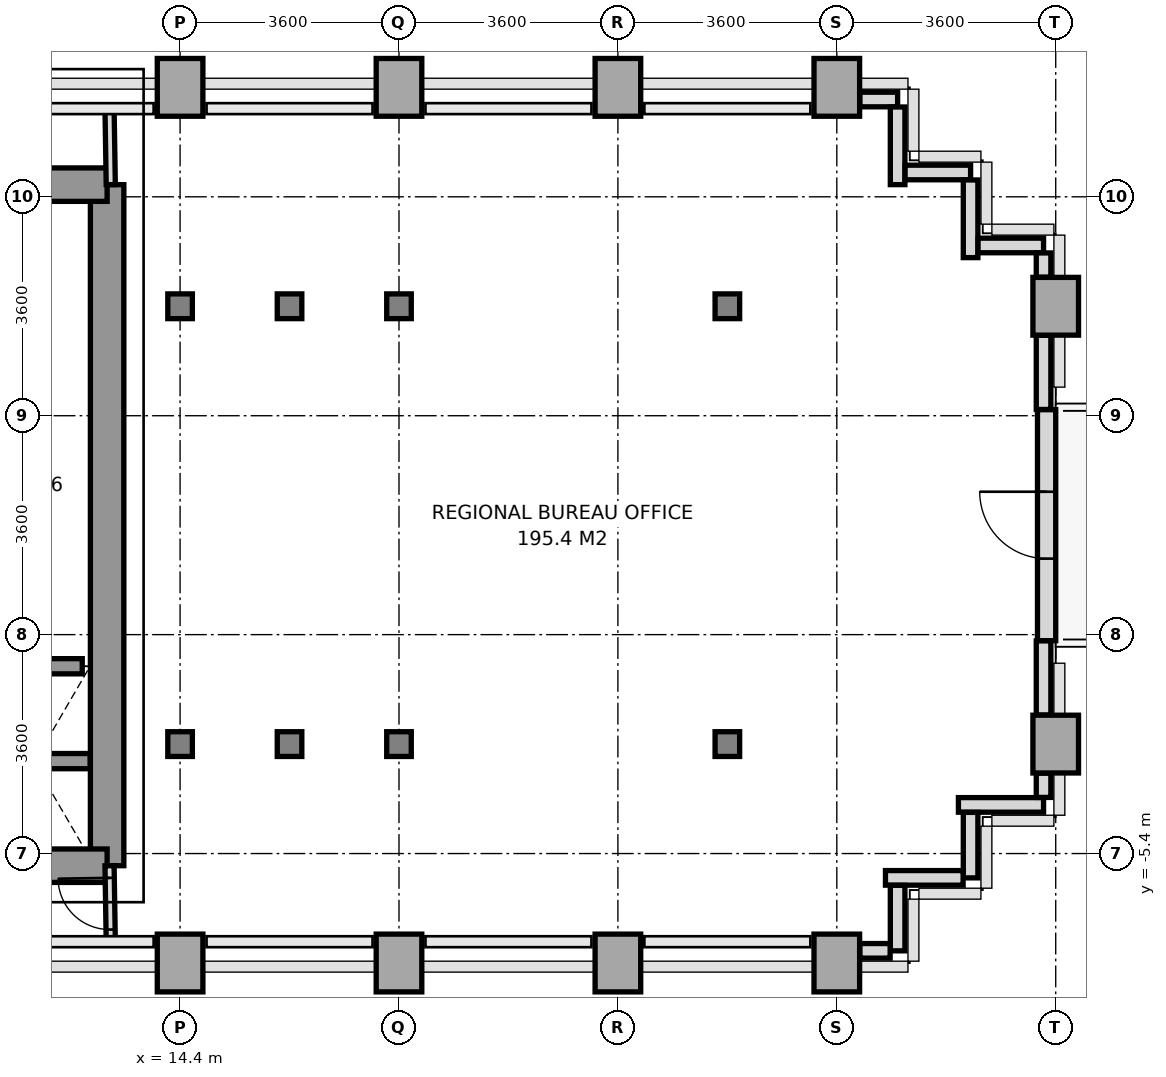
"""IFC4 building model, lengths in metres.
Left out: names, types, materials, properties, quantities, classifications, styles, units other than length and angle.
Written with IfcOpenShell. Run it as: python <this file> out.ifc"""

import sys

from ifc_helpers import new_model, si_unit, direction, frame, frame_2d, origin, origin_2d, place, context, subcontext, project, spatial, rectangle, i_section, extrude, source, transform, mapped, element, fill, save


model = new_model("IFC4")
c1 = context("Model", 3, precision=1e-05, world=origin(), true_north=direction((0.0, 1.0)))
c2 = subcontext(c1, "Body", "Model", "MODEL_VIEW")
j1 = project(units=[si_unit("LENGTHUNIT", "METRE"), si_unit("PLANEANGLEUNIT", "RADIAN")], contexts=[c1])
p1 = place(None, origin())
s1 = spatial("IfcSite", under=j1, at=p1, CompositionType="ELEMENT")
p2 = place(p1, origin())
s2 = spatial("IfcBuilding", under=s1, at=p2, CompositionType="ELEMENT")
p3 = place(p2, frame((0.0, 0.0, 40.8)))
s3 = spatial("IfcBuildingStorey", under=s2, at=p3, CompositionType="ELEMENT", Elevation=40.8)
m1 = source(origin(), c2, "Body", "SweptSolid", [
    extrude(rectangle(XDim=0.75, YDim=0.95, at=origin_2d()), origin(), (0.0, 0.0, 1.0), 3.2),
])
p4 = place(p3, frame((14.4, -7.2, 0.0), z_axis=(0.0, 0.0, 1.0), x_axis=(1.0, 0.0, 0.0)))
e1 = element("IfcColumn", 1, at=p4, inside=s3, PredefinedType="COLUMN", context=c2, shape_type="MappedRepresentation", body=[
    mapped(m1, transform((0.0, 0.0, 0.0), x_axis=(1.0, 0.0, 0.0), y_axis=(0.0, 1.0, 0.0), z_axis=(0.0, 0.0, 1.0), scale=1.0)),
])
m2 = source(origin(), c2, "Body", "SweptSolid", [
    extrude(i_section(OverallWidth=0.404, OverallDepth=0.407, WebThickness=0.022, FlangeThickness=0.035, at=origin_2d()), origin(), (0.0, 0.0, 1.0), 3.2),
])
for number, where, z_axis, x_axis in (
    (2, (14.4, -3.6, 0.0), (0.0, 0.0, 1.0), (1.0, 0.0, 0.0)),
    (3, (14.4, 3.6, 0.0), (0.0, 0.0, 1.0), (1.0, 0.0, 0.0)),
):
    element("IfcColumn", number, at=place(p3, frame(where, z_axis=z_axis, x_axis=x_axis)), inside=s3, PredefinedType="COLUMN", context=c2, shape_type="MappedRepresentation", body=[
        mapped(m2, transform((0.0, 0.0, 0.0), x_axis=(1.0, 0.0, 0.0), y_axis=(0.0, 1.0, 0.0), z_axis=(0.0, 0.0, 1.0), scale=1.0)),
    ])
p5 = place(p3, frame((14.4, 7.2, 0.0), z_axis=(0.0, 0.0, 1.0), x_axis=(1.0, 0.0, 0.0)))
e4 = element("IfcColumn", 4, at=p5, inside=s3, PredefinedType="COLUMN", context=c2, shape_type="MappedRepresentation", body=[
    mapped(m1, transform((0.0, 0.0, 0.0), x_axis=(1.0, 0.0, 0.0), y_axis=(0.0, 1.0, 0.0), z_axis=(0.0, 0.0, 1.0), scale=1.0)),
])
for number, where, z_axis, x_axis in (
    (5, (16.2, -3.6, 0.0), (0.0, 0.0, 1.0), (1.0, 0.0, 0.0)),
    (6, (16.2, 3.6, 0.0), (0.0, 0.0, 1.0), (1.0, 0.0, 0.0)),
):
    element("IfcColumn", number, at=place(p3, frame(where, z_axis=z_axis, x_axis=x_axis)), inside=s3, PredefinedType="COLUMN", context=c2, shape_type="MappedRepresentation", body=[
        mapped(m2, transform((0.0, 0.0, 0.0), x_axis=(1.0, 0.0, 0.0), y_axis=(0.0, 1.0, 0.0), z_axis=(0.0, 0.0, 1.0), scale=1.0)),
    ])
p6 = place(p3, frame((18.0, -7.2, 0.0), z_axis=(0.0, 0.0, 1.0), x_axis=(1.0, 0.0, 0.0)))
e7 = element("IfcColumn", 7, at=p6, inside=s3, PredefinedType="COLUMN", context=c2, shape_type="MappedRepresentation", body=[
    mapped(m1, transform((0.0, 0.0, 0.0), x_axis=(1.0, 0.0, 0.0), y_axis=(0.0, 1.0, 0.0), z_axis=(0.0, 0.0, 1.0), scale=1.0)),
])
for number, where, z_axis, x_axis in (
    (8, (18.0, -3.6, 0.0), (0.0, 0.0, 1.0), (1.0, 0.0, 0.0)),
    (9, (18.0, 3.6, 0.0), (0.0, 0.0, 1.0), (1.0, 0.0, 0.0)),
):
    element("IfcColumn", number, at=place(p3, frame(where, z_axis=z_axis, x_axis=x_axis)), inside=s3, PredefinedType="COLUMN", context=c2, shape_type="MappedRepresentation", body=[
        mapped(m2, transform((0.0, 0.0, 0.0), x_axis=(1.0, 0.0, 0.0), y_axis=(0.0, 1.0, 0.0), z_axis=(0.0, 0.0, 1.0), scale=1.0)),
    ])
for number, where, z_axis, x_axis in (
    (10, (18.0, 7.2, 0.0), (0.0, 0.0, 1.0), (1.0, 0.0, 0.0)),
    (11, (21.6, -7.2, 0.0), (0.0, 0.0, 1.0), (1.0, 0.0, 0.0)),
    (12, (21.6, 7.2, 0.0), (0.0, 0.0, 1.0), (1.0, 0.0, 0.0)),
):
    element("IfcColumn", number, at=place(p3, frame(where, z_axis=z_axis, x_axis=x_axis)), inside=s3, PredefinedType="COLUMN", context=c2, shape_type="MappedRepresentation", body=[
        mapped(m1, transform((0.0, 0.0, 0.0), x_axis=(1.0, 0.0, 0.0), y_axis=(0.0, 1.0, 0.0), z_axis=(0.0, 0.0, 1.0), scale=1.0)),
    ])
for number, where, z_axis, x_axis in (
    (13, (23.4, -3.6, 0.0), (0.0, 0.0, 1.0), (1.0, 0.0, 0.0)),
    (14, (23.4, 3.6, 0.0), (0.0, 0.0, 1.0), (1.0, 0.0, 0.0)),
):
    element("IfcColumn", number, at=place(p3, frame(where, z_axis=z_axis, x_axis=x_axis)), inside=s3, PredefinedType="COLUMN", context=c2, shape_type="MappedRepresentation", body=[
        mapped(m2, transform((0.0, 0.0, 0.0), x_axis=(1.0, 0.0, 0.0), y_axis=(0.0, 1.0, 0.0), z_axis=(0.0, 0.0, 1.0), scale=1.0)),
    ])
for number, where, z_axis, x_axis in (
    (15, (25.2, -7.2, 0.0), (0.0, 0.0, 1.0), (1.0, 0.0, 0.0)),
    (16, (25.2, 7.2, 0.0), (0.0, 0.0, 1.0), (1.0, 0.0, 0.0)),
    (17, (28.8, -3.6, 0.0), (0.0, 0.0, 1.0), (1.0, 0.0, 0.0)),
    (18, (28.8, 3.6, 0.0), (0.0, 0.0, 1.0), (1.0, 0.0, 0.0)),
):
    element("IfcColumn", number, at=place(p3, frame(where, z_axis=z_axis, x_axis=x_axis)), inside=s3, PredefinedType="COLUMN", context=c2, shape_type="MappedRepresentation", body=[
        mapped(m1, transform((0.0, 0.0, 0.0), x_axis=(1.0, 0.0, 0.0), y_axis=(0.0, 1.0, 0.0), z_axis=(0.0, 0.0, 1.0), scale=1.0)),
    ])
p7 = place(p3, frame((28.65, -1.9, 0.0), z_axis=(0.0, 0.0, 1.0), x_axis=(0.0, 1.0, 0.0)))
e19 = element("IfcWall", 19, at=p7, inside=s3, PredefinedType="SOLIDWALL", context=c2, shape_type="SweptSolid", body=[
    extrude(rectangle(XDim=3.8, YDim=0.3, at=frame_2d((1.9, 0.0))), origin(), (0.0, 0.0, 1.0), 2.45),
])
p8 = place(p7, frame((1.35, 0.0, 0.0)))
e20 = element("IfcOpeningElement", 20, at=p8, cuts=e19, PredefinedType="OPENING", context=c2, shape_type="SweptSolid", body=[
    extrude(rectangle(XDim=1.1, YDim=2.3, at=frame_2d((0.55, 1.15))), frame((0.0, 0.16, 0.0), z_axis=(0.0, -1.0, 0.0), x_axis=(1.0, 0.0, 0.0)), (0.0, 0.0, 1.0), 0.32),
])
p9 = place(p3, frame((28.6, -4.6, 0.0), z_axis=(0.0, 0.0, 1.0), x_axis=(-1.0, 0.0, 0.0)))
e21 = element("IfcWall", 21, at=p9, inside=s3, PredefinedType="PARAPET", context=c2, shape_type="SweptSolid", body=[
    extrude(rectangle(XDim=1.4, YDim=0.24, at=frame_2d((0.7, 0.0))), origin(), (0.0, 0.0, 1.0), 1.15),
])
p10 = place(p3, frame((27.4, -4.723, 0.0), z_axis=(0.0, 0.0, 1.0), x_axis=(0.0, -1.0, 0.0)))
e22 = element("IfcWall", 22, at=p10, inside=s3, PredefinedType="PARAPET", context=c2, shape_type="SweptSolid", body=[
    extrude(rectangle(XDim=1.077, YDim=0.24, at=frame_2d((0.539, 0.0))), origin(), (0.0, 0.0, 1.0), 1.15),
])
p11 = place(p3, frame((27.277, -5.8, 0.0), z_axis=(0.0, 0.0, 1.0), x_axis=(-1.0, 0.0, 0.0)))
e23 = element("IfcWall", 23, at=p11, inside=s3, PredefinedType="PARAPET", context=c2, shape_type="SweptSolid", body=[
    extrude(rectangle(XDim=1.277, YDim=0.24, at=frame_2d((0.639, 0.0))), origin(), (0.0, 0.0, 1.0), 1.15),
])
p12 = place(p3, frame((26.2, -5.923, 0.0), z_axis=(0.0, 0.0, 1.0), x_axis=(0.0, -1.0, 0.0)))
e24 = element("IfcWall", 24, at=p12, inside=s3, PredefinedType="PARAPET", context=c2, shape_type="SweptSolid", body=[
    extrude(rectangle(XDim=1.077, YDim=0.24, at=frame_2d((0.539, 0.0))), origin(), (0.0, 0.0, 1.0), 1.15),
])
p13 = place(p3, frame((26.077, -7.0, 0.0), z_axis=(0.0, 0.0, 1.0), x_axis=(-1.0, 0.0, 0.0)))
e25 = element("IfcWall", 25, at=p13, inside=s3, PredefinedType="PARAPET", context=c2, shape_type="SweptSolid", body=[
    extrude(rectangle(XDim=0.499, YDim=0.24, at=frame_2d((0.25, 0.0))), origin(), (0.0, 0.0, 1.0), 1.15),
])
p14 = place(p3, frame((25.578, 7.0, 0.0), z_axis=(0.0, 0.0, 1.0), x_axis=(1.0, 0.0, 0.0)))
e26 = element("IfcWall", 26, at=p14, inside=s3, PredefinedType="PARAPET", context=c2, shape_type="SweptSolid", body=[
    extrude(rectangle(XDim=0.622, YDim=0.24, at=frame_2d((0.311, 0.0))), origin(), (0.0, 0.0, 1.0), 1.15),
])
p15 = place(p3, frame((26.2, 6.877, 0.0), z_axis=(0.0, 0.0, 1.0), x_axis=(0.0, -1.0, 0.0)))
e27 = element("IfcWall", 27, at=p15, inside=s3, PredefinedType="PARAPET", context=c2, shape_type="SweptSolid", body=[
    extrude(rectangle(XDim=1.277, YDim=0.24, at=frame_2d((0.638, 0.0))), origin(), (0.0, 0.0, 1.0), 1.15),
])
p16 = place(p3, frame((26.323, 5.8, 0.0), z_axis=(0.0, 0.0, 1.0), x_axis=(1.0, 0.0, 0.0)))
e28 = element("IfcWall", 28, at=p16, inside=s3, PredefinedType="PARAPET", context=c2, shape_type="SweptSolid", body=[
    extrude(rectangle(XDim=1.077, YDim=0.24, at=frame_2d((0.539, 0.0))), origin(), (0.0, 0.0, 1.0), 1.15),
])
p17 = place(p3, frame((27.4, 5.677, 0.0), z_axis=(0.0, 0.0, 1.0), x_axis=(0.0, -1.0, 0.0)))
e29 = element("IfcWall", 29, at=p17, inside=s3, PredefinedType="PARAPET", context=c2, shape_type="SweptSolid", body=[
    extrude(rectangle(XDim=1.277, YDim=0.24, at=frame_2d((0.639, 0.0))), origin(), (0.0, 0.0, 1.0), 1.15),
])
p18 = place(p3, frame((27.523, 4.6, 0.0), z_axis=(0.0, 0.0, 1.0), x_axis=(1.0, 0.0, 0.0)))
e30 = element("IfcWall", 30, at=p18, inside=s3, PredefinedType="PARAPET", context=c2, shape_type="SweptSolid", body=[
    extrude(rectangle(XDim=1.077, YDim=0.24, at=frame_2d((0.539, 0.0))), origin(), (0.0, 0.0, 1.0), 1.15),
])
p19 = place(p3, frame((28.6, 4.477, 0.0), z_axis=(0.0, 0.0, 1.0), x_axis=(0.0, -1.0, 0.0)))
e31 = element("IfcWall", 31, at=p19, inside=s3, PredefinedType="PARAPET", context=c2, shape_type="SweptSolid", body=[
    extrude(rectangle(XDim=0.399, YDim=0.24, at=frame_2d((0.2, 0.0))), origin(), (0.0, 0.0, 1.0), 1.15),
])
for number, where, z_axis, x_axis in (
    (32, (28.6, 3.122, 0.0), (0.0, 0.0, 1.0), (0.0, -1.0, 0.0)),
    (33, (28.6, -1.903, 0.0), (0.0, 0.0, 1.0), (0.0, -1.0, 0.0)),
):
    element("IfcWall", number, at=place(p3, frame(where, z_axis=z_axis, x_axis=x_axis)), inside=s3, PredefinedType="PARAPET", context=c2, shape_type="SweptSolid", body=[
        extrude(rectangle(XDim=1.219, YDim=0.24, at=frame_2d((0.609, 0.0))), origin(), (0.0, 0.0, 1.0), 1.15),
    ])
p20 = place(p3, frame((28.6, -4.078, 0.0), z_axis=(0.0, 0.0, 1.0), x_axis=(0.0, -1.0, 0.0)))
e34 = element("IfcWall", 34, at=p20, inside=s3, PredefinedType="PARAPET", context=c2, shape_type="SweptSolid", body=[
    extrude(rectangle(XDim=0.399, YDim=0.24, at=frame_2d((0.2, 0.0))), origin(), (0.0, 0.0, 1.0), 1.15),
])
p21 = place(p3, frame((13.2, -5.6, 0.0), z_axis=(0.0, 0.0, 1.0), x_axis=(0.0, 1.0, 0.0)))
e35 = element("IfcWall", 35, at=p21, inside=s3, PredefinedType="SHEAR", context=c2, shape_type="SweptSolid", body=[
    extrude(rectangle(XDim=11.2, YDim=0.55, at=frame_2d((5.6, 0.0))), origin(), (0.0, 0.0, 1.0), 3.2),
])
p22 = place(p3, frame((11.381, 5.6, 0.0), z_axis=(0.0, 0.0, 1.0), x_axis=(1.0, 0.0, 0.0)))
e36 = element("IfcWall", 36, at=p22, inside=s3, PredefinedType="SHEAR", context=c2, shape_type="SweptSolid", body=[
    extrude(rectangle(XDim=1.819, YDim=0.55, at=frame_2d((0.909, 0.0))), origin(), (0.0, 0.0, 1.0), 3.2),
])
p23 = place(p3, frame((5.4, -5.6, 0.0), z_axis=(0.0, 0.0, 1.0), x_axis=(1.0, 0.0, 0.0)))
e37 = element("IfcWall", 37, at=p23, inside=s3, PredefinedType="SHEAR", context=c2, shape_type="SweptSolid", body=[
    extrude(rectangle(XDim=7.8, YDim=0.55, at=frame_2d((3.9, 0.0))), origin(), (0.0, 0.0, 1.0), 3.2),
])
p24 = place(p23, frame((3.0, 0.0, 0.0)))
e38 = element("IfcOpeningElement", 38, at=p24, cuts=e37, PredefinedType="OPENING", context=c2, shape_type="SweptSolid", body=[
    extrude(rectangle(XDim=1.2, YDim=2.2, at=frame_2d((0.6, 1.1))), frame((0.0, 0.285, 0.0), z_axis=(0.0, -1.0, 0.0), x_axis=(1.0, 0.0, 0.0)), (0.0, 0.0, 1.0), 0.57),
])
p25 = place(p3, frame((11.08, -3.88, 0.0), z_axis=(0.0, 0.0, 1.0), x_axis=(1.0, 0.0, 0.0)))
e39 = element("IfcWall", 39, at=p25, inside=s3, PredefinedType="SOLIDWALL", context=c2, shape_type="SweptSolid", body=[
    extrude(rectangle(XDim=1.84, YDim=0.25, at=frame_2d((0.92, 0.0))), origin(), (0.0, 0.0, 1.0), 3.2),
])
p26 = place(p3, frame((11.209, -2.32, 0.0), z_axis=(0.0, 0.0, 1.0), x_axis=(1.0, 0.0, 0.0)))
e40 = element("IfcWall", 40, at=p26, inside=s3, PredefinedType="SOLIDWALL", context=c2, shape_type="SweptSolid", body=[
    extrude(rectangle(XDim=1.582, YDim=0.25, at=frame_2d((0.791, 0.0))), origin(), (0.0, 0.0, 1.0), 3.2),
])
p27 = place(p3, frame((13.26, 5.6, 0.0), z_axis=(0.0, 0.0, 1.0), x_axis=(-0.016013571389, 0.999871774545, 0.0)))
e41 = element("IfcWall", 41, at=p27, inside=s3, PredefinedType="PARTITIONING", context=c2, shape_type="SweptSolid", body=[
    extrude(rectangle(XDim=1.25, YDim=0.15, at=frame_2d((0.625, 0.0))), origin(), (0.0, 0.0, 1.0), 3.2),
])
p28 = place(p3, frame((13.26, -6.85, 0.0), z_axis=(0.0, 0.0, 1.0), x_axis=(-0.016013571389, 0.999871774545, 0.0)))
e42 = element("IfcWall", 42, at=p28, inside=s3, PredefinedType="PARTITIONING", context=c2, shape_type="SweptSolid", body=[
    extrude(rectangle(XDim=1.25, YDim=0.15, at=frame_2d((0.625, 0.0))), origin(), (0.0, 0.0, 1.0), 3.2),
])
p29 = place(p28, frame((0.2, 0.0, 0.0)))
e43 = element("IfcOpeningElement", 43, at=p29, cuts=e42, PredefinedType="OPENING", context=c2, shape_type="SweptSolid", body=[
    extrude(rectangle(XDim=0.85, YDim=2.1, at=frame_2d((0.425, 1.05))), frame((0.0, 0.085, 0.0), z_axis=(0.0, -1.0, 0.0), x_axis=(1.0, 0.0, 0.0)), (0.0, 0.0, 1.0), 0.17),
])
m3 = source(origin(), c2, "Body", "SweptSolid", [
    extrude(rectangle(XDim=1.1, YDim=2.3, at=frame_2d((0.55, 1.15))), frame((0.0, 0.025, 0.0), z_axis=(0.0, -1.0, 0.0), x_axis=(1.0, 0.0, 0.0)), (0.0, 0.0, 1.0), 0.05),
])
p30 = place(p8, frame((1.1, 0.0, 0.0), z_axis=(0.0, 0.0, 1.0), x_axis=(-1.0, 0.0, 0.0)))
e44 = element("IfcDoor", 44, at=p30, inside=s3, OperationType="SINGLE_SWING_RIGHT", PredefinedType="DOOR", context=c2, shape_type="MappedRepresentation", body=[
    mapped(m3, transform((0.0, 0.0, 0.0), x_axis=(1.0, 0.0, 0.0), y_axis=(0.0, 1.0, 0.0), z_axis=(0.0, 0.0, 1.0), scale=1.0)),
])
fill(e20, e44)
m4 = source(origin(), c2, "Body", "SweptSolid", [
    extrude(rectangle(XDim=0.85, YDim=2.1, at=frame_2d((0.425, 1.05))), frame((0.0, 0.025, 0.0), z_axis=(0.0, -1.0, 0.0), x_axis=(1.0, 0.0, 0.0)), (0.0, 0.0, 1.0), 0.05),
])
p31 = place(p29, origin())
e45 = element("IfcDoor", 45, at=p31, inside=s3, OperationType="SINGLE_SWING_RIGHT", PredefinedType="DOOR", context=c2, shape_type="MappedRepresentation", body=[
    mapped(m4, transform((0.0, 0.0, 0.0), x_axis=(1.0, 0.0, 0.0), y_axis=(0.0, 1.0, 0.0), z_axis=(0.0, 0.0, 1.0), scale=1.0)),
])
fill(e43, e45)
save(model, sys.argv[1])
